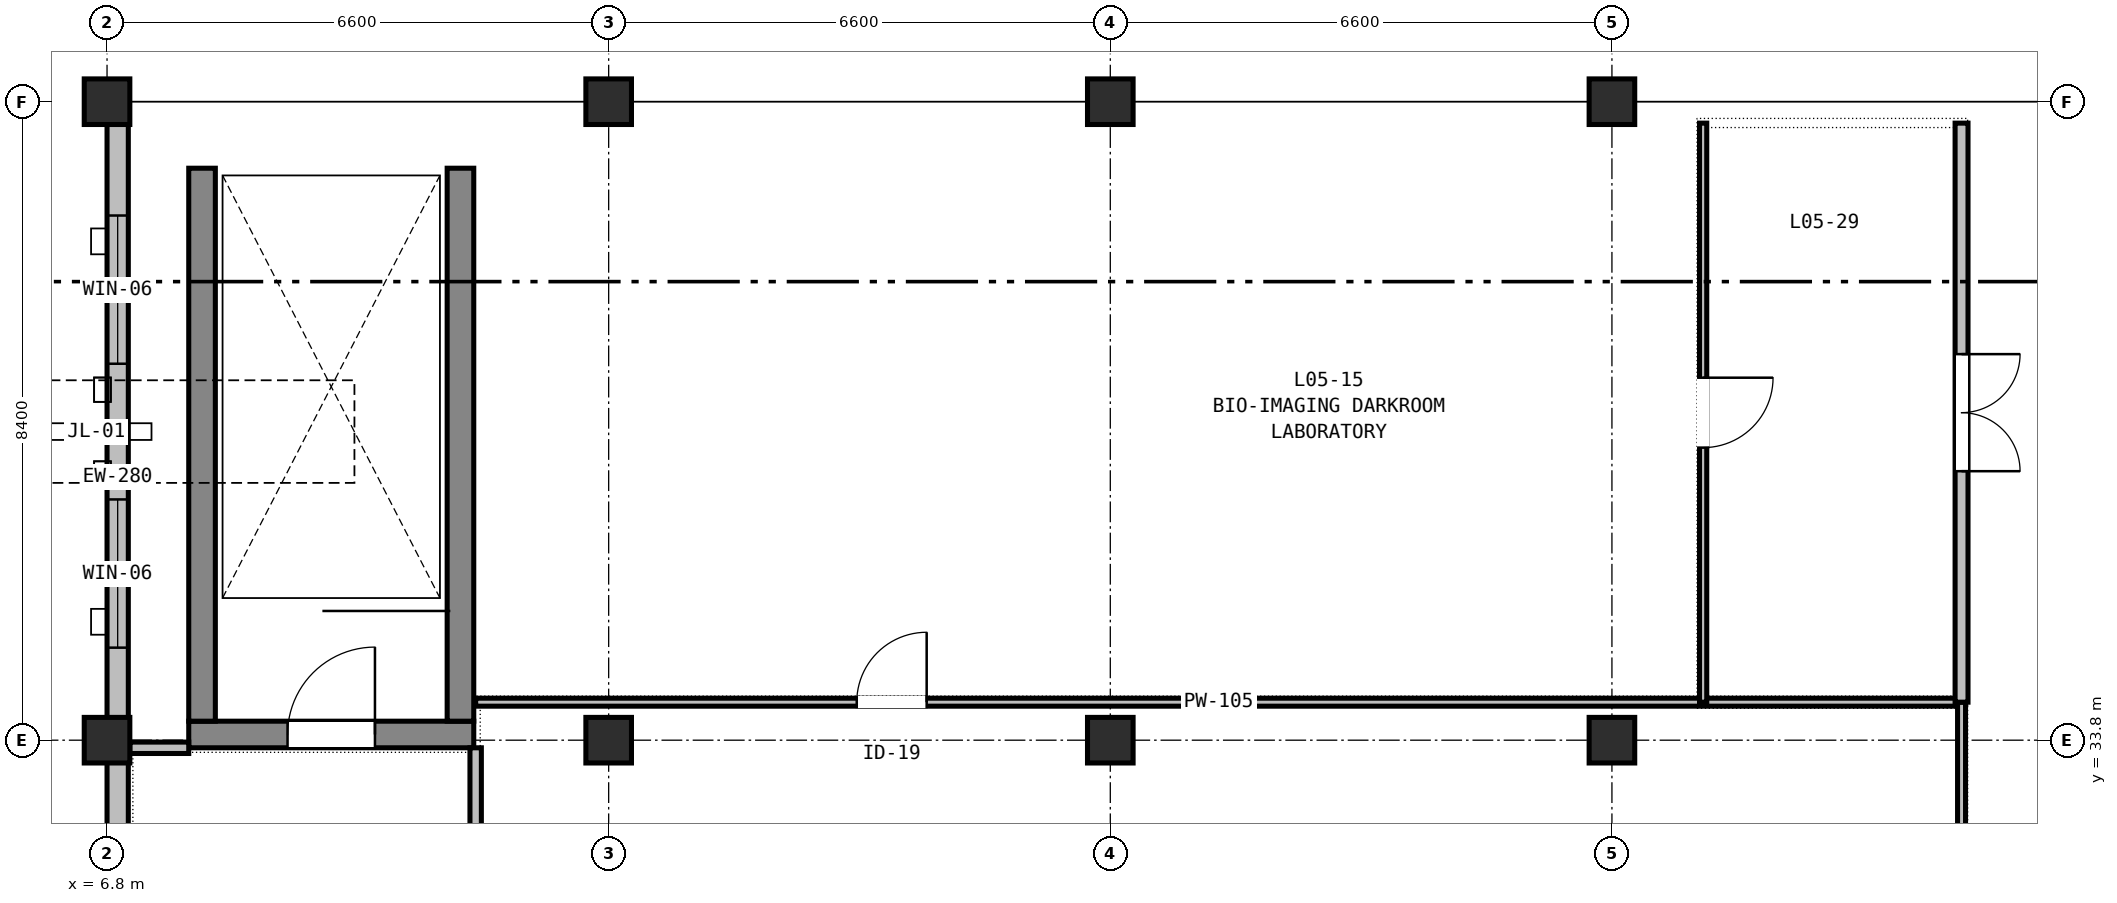
"""IFC4 building model, lengths in metres.
Left out: names, types, materials, properties, quantities, classifications, styles, units other than length and angle.
Written with IfcOpenShell. Run it as: python <this file> out.ifc"""

import sys

from ifc_helpers import new_model, si_unit, direction, frame, frame_2d, origin, origin_2d, place, context, subcontext, project, spatial, rectangle, extrude, element, fill, save


model = new_model("IFC4")
c1 = context("Model", 3, precision=1e-05, world=origin(), true_north=direction((0.0, 1.0)))
c2 = subcontext(c1, "Body", "Model", "MODEL_VIEW")
j1 = project(units=[si_unit("LENGTHUNIT", "METRE"), si_unit("PLANEANGLEUNIT", "RADIAN")], contexts=[c1])
p1 = place(None, origin())
s1 = spatial("IfcSite", under=j1, at=p1, CompositionType="ELEMENT")
p2 = place(p1, origin())
s2 = spatial("IfcBuilding", under=s1, at=p2, CompositionType="ELEMENT")
p3 = place(p2, frame((0.0, 0.0, 24.0)))
s3 = spatial("IfcBuildingStorey", under=s2, at=p3, CompositionType="ELEMENT", Elevation=24.0)
for number, where, z_axis, x_axis in (
    (1, (6.8, 33.8, 0.0), (0.0, 0.0, 1.0), (1.0, 0.0, 0.0)),
    (2, (6.8, 42.2, 0.0), (0.0, 0.0, 1.0), (1.0, 0.0, 0.0)),
    (3, (13.4, 33.8, 0.0), (0.0, 0.0, 1.0), (1.0, 0.0, 0.0)),
    (4, (13.4, 42.2, 0.0), (0.0, 0.0, 1.0), (1.0, 0.0, 0.0)),
    (5, (20.0, 33.8, 0.0), (0.0, 0.0, 1.0), (1.0, 0.0, 0.0)),
    (6, (20.0, 42.2, 0.0), (0.0, 0.0, 1.0), (1.0, 0.0, 0.0)),
    (7, (26.6, 33.8, 0.0), (0.0, 0.0, 1.0), (1.0, 0.0, 0.0)),
    (8, (26.6, 42.2, 0.0), (0.0, 0.0, 1.0), (1.0, 0.0, 0.0)),
):
    element("IfcColumn", number, at=place(p3, frame(where, z_axis=z_axis, x_axis=x_axis)), inside=s3, PredefinedType="COLUMN", context=c2, shape_type="SweptSolid", body=[
        extrude(rectangle(XDim=0.6, YDim=0.6, at=origin_2d()), origin(), (0.0, 0.0, 1.0), 4.44),
    ])
p4 = place(p3, frame((7.875, 33.875, 0.0), z_axis=(0.0, 0.0, 1.0), x_axis=(1.0, 0.0, 0.0)))
e9 = element("IfcWall", 9, at=p4, inside=s3, PredefinedType="SHEAR", context=c2, shape_type="SweptSolid", body=[
    extrude(rectangle(XDim=3.75, YDim=0.35, at=frame_2d((1.875, 0.0))), origin(), (0.0, 0.0, 1.0), 4.44),
])
p5 = place(p4, frame((1.3, 0.0, 0.0)))
e10 = element("IfcOpeningElement", 10, at=p5, cuts=e9, PredefinedType="OPENING", context=c2, shape_type="SweptSolid", body=[
    extrude(rectangle(XDim=1.15, YDim=2.15, at=frame_2d((0.575, 1.075))), frame((0.0, 0.185, 0.0), z_axis=(0.0, -1.0, 0.0), x_axis=(1.0, 0.0, 0.0)), (0.0, 0.0, 1.0), 0.37),
])
p6 = place(p3, frame((7.875, 41.5, 0.0), z_axis=(0.0, 0.0, 1.0), x_axis=(1.0, 0.0, 0.0)))
e11 = element("IfcWall", 11, at=p6, inside=s3, PredefinedType="SHEAR", context=c2, shape_type="SweptSolid", body=[
    extrude(rectangle(XDim=3.75, YDim=0.35, at=frame_2d((1.875, 0.0))), origin(), (0.0, 0.0, 1.0), 4.44),
])
for number, where, z_axis, x_axis in (
    (12, (8.05, 34.05, 0.0), (0.0, 0.0, 1.0), (0.0, 1.0, 0.0)),
    (13, (11.45, 34.05, 0.0), (0.0, 0.0, 1.0), (0.0, 1.0, 0.0)),
):
    element("IfcWall", number, at=place(p3, frame(where, z_axis=z_axis, x_axis=x_axis)), inside=s3, PredefinedType="SHEAR", context=c2, shape_type="SweptSolid", body=[
        extrude(rectangle(XDim=7.275, YDim=0.35, at=frame_2d((3.637, 0.0))), origin(), (0.0, 0.0, 1.0), 4.44),
    ])
p7 = place(p3, frame((6.8, 42.06, 0.0), z_axis=(0.0, 0.0, 1.0), x_axis=(1.0, 0.0, 0.0)))
e14 = element("IfcWall", 14, at=p7, inside=s3, PredefinedType="STANDARD", context=c2, shape_type="SweptSolid", body=[
    extrude(rectangle(XDim=6.6, YDim=0.28, at=frame_2d((3.3, 0.0))), origin(), (0.0, 0.0, 1.0), 3.735),
])
p8 = place(p7, frame((0.982, 0.0, 0.9)))
e15 = element("IfcOpeningElement", 15, at=p8, cuts=e14, PredefinedType="OPENING", context=c2, shape_type="SweptSolid", body=[
    extrude(rectangle(XDim=1.6, YDim=1.6, at=frame_2d((0.8, 0.8))), frame((0.0, 0.15, 0.0), z_axis=(0.0, -1.0, 0.0), x_axis=(1.0, 0.0, 0.0)), (0.0, 0.0, 1.0), 0.3),
])
p9 = place(p7, frame((4.018, 0.0, 0.9)))
e16 = element("IfcOpeningElement", 16, at=p9, cuts=e14, PredefinedType="OPENING", context=c2, shape_type="SweptSolid", body=[
    extrude(rectangle(XDim=1.6, YDim=1.6, at=frame_2d((0.8, 0.8))), frame((0.0, 0.15, 0.0), z_axis=(0.0, -1.0, 0.0), x_axis=(1.0, 0.0, 0.0)), (0.0, 0.0, 1.0), 0.3),
])
p10 = place(p3, frame((13.4, 42.06, 0.0), z_axis=(0.0, 0.0, 1.0), x_axis=(1.0, 0.0, 0.0)))
e17 = element("IfcWall", 17, at=p10, inside=s3, PredefinedType="STANDARD", context=c2, shape_type="SweptSolid", body=[
    extrude(rectangle(XDim=6.6, YDim=0.28, at=frame_2d((3.3, 0.0))), origin(), (0.0, 0.0, 1.0), 3.735),
])
p11 = place(p10, frame((0.857, 0.0, 0.9)))
e18 = element("IfcOpeningElement", 18, at=p11, cuts=e17, PredefinedType="OPENING", context=c2, shape_type="SweptSolid", body=[
    extrude(rectangle(XDim=1.85, YDim=1.6, at=frame_2d((0.925, 0.8))), frame((0.0, 0.15, 0.0), z_axis=(0.0, -1.0, 0.0), x_axis=(1.0, 0.0, 0.0)), (0.0, 0.0, 1.0), 0.3),
])
p12 = place(p10, frame((3.893, 0.0, 0.9)))
e19 = element("IfcOpeningElement", 19, at=p12, cuts=e17, PredefinedType="OPENING", context=c2, shape_type="SweptSolid", body=[
    extrude(rectangle(XDim=1.85, YDim=1.6, at=frame_2d((0.925, 0.8))), frame((0.0, 0.15, 0.0), z_axis=(0.0, -1.0, 0.0), x_axis=(1.0, 0.0, 0.0)), (0.0, 0.0, 1.0), 0.3),
])
p13 = place(p3, frame((20.0, 42.06, 0.0), z_axis=(0.0, 0.0, 1.0), x_axis=(1.0, 0.0, 0.0)))
e20 = element("IfcWall", 20, at=p13, inside=s3, PredefinedType="STANDARD", context=c2, shape_type="SweptSolid", body=[
    extrude(rectangle(XDim=6.6, YDim=0.28, at=frame_2d((3.3, 0.0))), origin(), (0.0, 0.0, 1.0), 3.735),
])
p14 = place(p13, frame((0.757, 0.0, 0.9)))
e21 = element("IfcOpeningElement", 21, at=p14, cuts=e20, PredefinedType="OPENING", context=c2, shape_type="SweptSolid", body=[
    extrude(rectangle(XDim=2.05, YDim=1.65, at=frame_2d((1.025, 0.825))), frame((0.0, 0.15, 0.0), z_axis=(0.0, -1.0, 0.0), x_axis=(1.0, 0.0, 0.0)), (0.0, 0.0, 1.0), 0.3),
])
p15 = place(p13, frame((3.793, 0.0, 0.9)))
e22 = element("IfcOpeningElement", 22, at=p15, cuts=e20, PredefinedType="OPENING", context=c2, shape_type="SweptSolid", body=[
    extrude(rectangle(XDim=2.05, YDim=1.65, at=frame_2d((1.025, 0.825))), frame((0.0, 0.15, 0.0), z_axis=(0.0, -1.0, 0.0), x_axis=(1.0, 0.0, 0.0)), (0.0, 0.0, 1.0), 0.3),
])
p16 = place(p3, frame((26.6, 42.06, 0.0), z_axis=(0.0, 0.0, 1.0), x_axis=(1.0, 0.0, 0.0)))
e23 = element("IfcWall", 23, at=p16, inside=s3, PredefinedType="STANDARD", context=c2, shape_type="SweptSolid", body=[
    extrude(rectangle(XDim=6.6, YDim=0.28, at=frame_2d((3.3, 0.0))), origin(), (0.0, 0.0, 1.0), 3.735),
])
p17 = place(p16, frame((1.44, 0.0, 0.9)))
e24 = element("IfcOpeningElement", 24, at=p17, cuts=e23, PredefinedType="OPENING", context=c2, shape_type="SweptSolid", body=[
    extrude(rectangle(XDim=2.35, YDim=1.5, at=frame_2d((1.175, 0.75))), frame((0.0, 0.15, 0.0), z_axis=(0.0, -1.0, 0.0), x_axis=(1.0, 0.0, 0.0)), (0.0, 0.0, 1.0), 0.3),
])
p18 = place(p3, frame((6.94, 25.4, 0.0), z_axis=(0.0, 0.0, 1.0), x_axis=(0.0, 1.0, 0.0)))
e25 = element("IfcWall", 25, at=p18, inside=s3, PredefinedType="STANDARD", context=c2, shape_type="SweptSolid", body=[
    extrude(rectangle(XDim=8.4, YDim=0.28, at=frame_2d((4.2, 0.0))), origin(), (0.0, 0.0, 1.0), 3.885),
])
p19 = place(p18, frame((1.368, 0.0, 0.9)))
e26 = element("IfcOpeningElement", 26, at=p19, cuts=e25, PredefinedType="OPENING", context=c2, shape_type="SweptSolid", body=[
    extrude(rectangle(XDim=1.8, YDim=2.1, at=frame_2d((0.9, 1.05))), frame((0.0, 0.15, 0.0), z_axis=(0.0, -1.0, 0.0), x_axis=(1.0, 0.0, 0.0)), (0.0, 0.0, 1.0), 0.3),
])
p20 = place(p18, frame((5.232, 0.0, 0.9)))
e27 = element("IfcOpeningElement", 27, at=p20, cuts=e25, PredefinedType="OPENING", context=c2, shape_type="SweptSolid", body=[
    extrude(rectangle(XDim=1.8, YDim=2.1, at=frame_2d((0.9, 1.05))), frame((0.0, 0.15, 0.0), z_axis=(0.0, -1.0, 0.0), x_axis=(1.0, 0.0, 0.0)), (0.0, 0.0, 1.0), 0.3),
])
p21 = place(p3, frame((6.94, 33.8, 0.0), z_axis=(0.0, 0.0, 1.0), x_axis=(0.0, 1.0, 0.0)))
e28 = element("IfcWall", 28, at=p21, inside=s3, PredefinedType="STANDARD", context=c2, shape_type="SweptSolid", body=[
    extrude(rectangle(XDim=8.12, YDim=0.28, at=frame_2d((4.06, 0.0))), origin(), (0.0, 0.0, 1.0), 3.885),
])
p22 = place(p21, frame((1.217, 0.0, 0.9)))
e29 = element("IfcOpeningElement", 29, at=p22, cuts=e28, PredefinedType="OPENING", context=c2, shape_type="SweptSolid", body=[
    extrude(rectangle(XDim=1.95, YDim=2.1, at=frame_2d((0.975, 1.05))), frame((0.0, 0.15, 0.0), z_axis=(0.0, -1.0, 0.0), x_axis=(1.0, 0.0, 0.0)), (0.0, 0.0, 1.0), 0.3),
])
p23 = place(p21, frame((4.953, 0.0, 0.9)))
e30 = element("IfcOpeningElement", 30, at=p23, cuts=e28, PredefinedType="OPENING", context=c2, shape_type="SweptSolid", body=[
    extrude(rectangle(XDim=1.95, YDim=2.1, at=frame_2d((0.975, 1.05))), frame((0.0, 0.15, 0.0), z_axis=(0.0, -1.0, 0.0), x_axis=(1.0, 0.0, 0.0)), (0.0, 0.0, 1.0), 0.3),
])
p24 = place(p3, frame((7.1, 33.7, 0.0), z_axis=(0.0, 0.0, 1.0), x_axis=(1.0, 0.0, 0.0)))
e31 = element("IfcWall", 31, at=p24, inside=s3, PredefinedType="PARTITIONING", context=c2, shape_type="SweptSolid", body=[
    extrude(rectangle(XDim=0.775, YDim=0.15, at=frame_2d((0.387, 0.0))), origin(), (0.0, 0.0, 1.0), 3.885),
])
p25 = place(p3, frame((11.65, 33.7, 0.0), z_axis=(0.0, 0.0, 1.0), x_axis=(0.0, -1.0, 0.0)))
e32 = element("IfcWall", 32, at=p25, inside=s3, PredefinedType="PARTITIONING", context=c2, shape_type="SweptSolid", body=[
    extrude(rectangle(XDim=3.6, YDim=0.15, at=frame_2d((1.8, 0.0))), origin(), (0.0, 0.0, 1.0), 3.885),
])
p26 = place(p3, frame((11.65, 34.3, 0.0), z_axis=(0.0, 0.0, 1.0), x_axis=(1.0, 0.0, 0.0)))
e33 = element("IfcWall", 33, at=p26, inside=s3, PredefinedType="PARTITIONING", context=c2, shape_type="SweptSolid", body=[
    extrude(rectangle(XDim=19.55, YDim=0.105, at=frame_2d((9.775, 0.0))), origin(), (0.0, 0.0, 1.0), 3.735),
])
p27 = place(p26, frame((5.014, 0.0, 0.0)))
e34 = element("IfcOpeningElement", 34, at=p27, cuts=e33, PredefinedType="OPENING", context=c2, shape_type="SweptSolid", body=[
    extrude(rectangle(XDim=0.92, YDim=2.14, at=frame_2d((0.46, 1.07))), frame((0.0, 0.062, 0.0), z_axis=(0.0, -1.0, 0.0), x_axis=(1.0, 0.0, 0.0)), (0.0, 0.0, 1.0), 0.125),
])
p28 = place(p3, frame((31.2, 34.3, 0.0), z_axis=(0.0, 0.0, 1.0), x_axis=(0.0, -1.0, 0.0)))
e35 = element("IfcWall", 35, at=p28, inside=s3, PredefinedType="PARTITIONING", context=c2, shape_type="SweptSolid", body=[
    extrude(rectangle(XDim=8.9, YDim=0.105, at=frame_2d((4.45, 0.0))), origin(), (0.0, 0.0, 1.0), 3.885),
])
p29 = place(p28, frame((3.86, 0.0, 0.0)))
e36 = element("IfcOpeningElement", 36, at=p29, cuts=e35, PredefinedType="OPENING", context=c2, shape_type="SweptSolid", body=[
    extrude(rectangle(XDim=1.18, YDim=2.1, at=frame_2d((0.59, 1.05))), frame((0.0, 0.062, 0.0), z_axis=(0.0, -1.0, 0.0), x_axis=(1.0, 0.0, 0.0)), (0.0, 0.0, 1.0), 0.125),
])
p30 = place(p3, frame((27.8, 41.918, 0.0), z_axis=(0.0, 0.0, 1.0), x_axis=(0.0, -1.0, 0.0)))
e37 = element("IfcWall", 37, at=p30, inside=s3, PredefinedType="PARTITIONING", context=c2, shape_type="SweptSolid", body=[
    extrude(rectangle(XDim=7.618, YDim=0.095, at=frame_2d((3.809, 0.0))), origin(), (0.0, 0.0, 1.0), 4.215),
])
p31 = place(p30, frame((3.349, 0.0, 0.0)))
e38 = element("IfcOpeningElement", 38, at=p31, cuts=e37, PredefinedType="OPENING", context=c2, shape_type="SweptSolid", body=[
    extrude(rectangle(XDim=0.92, YDim=2.14, at=frame_2d((0.46, 1.07))), frame((0.0, 0.057, 0.0), z_axis=(0.0, -1.0, 0.0), x_axis=(1.0, 0.0, 0.0)), (0.0, 0.0, 1.0), 0.115),
])
p32 = place(p3, frame((31.2, 41.918, 0.0), z_axis=(0.0, 0.0, 1.0), x_axis=(0.0, -1.0, 0.0)))
e39 = element("IfcWall", 39, at=p32, inside=s3, PredefinedType="PARTITIONING", context=c2, shape_type="SweptSolid", body=[
    extrude(rectangle(XDim=7.618, YDim=0.17, at=frame_2d((3.809, 0.0))), origin(), (0.0, 0.0, 1.0), 4.215),
])
p33 = place(p32, frame((3.039, 0.0, 0.0)))
e40 = element("IfcOpeningElement", 40, at=p33, cuts=e39, PredefinedType="OPENING", context=c2, shape_type="SweptSolid", body=[
    extrude(rectangle(XDim=1.54, YDim=2.2, at=frame_2d((0.77, 1.1))), frame((0.0, 0.095, 0.0), z_axis=(0.0, -1.0, 0.0), x_axis=(1.0, 0.0, 0.0)), (0.0, 0.0, 1.0), 0.19),
])
p34 = place(p8, origin())
e41 = element("IfcWindow", 41, at=p34, inside=s3, PartitioningType="SINGLE_PANEL", PredefinedType="WINDOW", context=c2, shape_type="SweptSolid", body=[
    extrude(rectangle(XDim=1.6, YDim=1.6, at=frame_2d((0.8, 0.8))), frame((0.0, 0.03, 0.0), z_axis=(0.0, -1.0, 0.0), x_axis=(1.0, 0.0, 0.0)), (0.0, 0.0, 1.0), 0.06),
])
fill(e15, e41)
p35 = place(p9, origin())
e42 = element("IfcWindow", 42, at=p35, inside=s3, PartitioningType="SINGLE_PANEL", PredefinedType="WINDOW", context=c2, shape_type="SweptSolid", body=[
    extrude(rectangle(XDim=1.6, YDim=1.6, at=frame_2d((0.8, 0.8))), frame((0.0, 0.03, 0.0), z_axis=(0.0, -1.0, 0.0), x_axis=(1.0, 0.0, 0.0)), (0.0, 0.0, 1.0), 0.06),
])
fill(e16, e42)
p36 = place(p11, origin())
e43 = element("IfcWindow", 43, at=p36, inside=s3, PartitioningType="SINGLE_PANEL", PredefinedType="WINDOW", context=c2, shape_type="SweptSolid", body=[
    extrude(rectangle(XDim=1.85, YDim=1.6, at=frame_2d((0.925, 0.8))), frame((0.0, 0.03, 0.0), z_axis=(0.0, -1.0, 0.0), x_axis=(1.0, 0.0, 0.0)), (0.0, 0.0, 1.0), 0.06),
])
fill(e18, e43)
p37 = place(p12, origin())
e44 = element("IfcWindow", 44, at=p37, inside=s3, PartitioningType="SINGLE_PANEL", PredefinedType="WINDOW", context=c2, shape_type="SweptSolid", body=[
    extrude(rectangle(XDim=1.85, YDim=1.6, at=frame_2d((0.925, 0.8))), frame((0.0, 0.03, 0.0), z_axis=(0.0, -1.0, 0.0), x_axis=(1.0, 0.0, 0.0)), (0.0, 0.0, 1.0), 0.06),
])
fill(e19, e44)
p38 = place(p14, origin())
e45 = element("IfcWindow", 45, at=p38, inside=s3, PartitioningType="SINGLE_PANEL", PredefinedType="WINDOW", context=c2, shape_type="SweptSolid", body=[
    extrude(rectangle(XDim=2.05, YDim=1.65, at=frame_2d((1.025, 0.825))), frame((0.0, 0.03, 0.0), z_axis=(0.0, -1.0, 0.0), x_axis=(1.0, 0.0, 0.0)), (0.0, 0.0, 1.0), 0.06),
])
fill(e21, e45)
p39 = place(p15, origin())
e46 = element("IfcWindow", 46, at=p39, inside=s3, PartitioningType="SINGLE_PANEL", PredefinedType="WINDOW", context=c2, shape_type="SweptSolid", body=[
    extrude(rectangle(XDim=2.05, YDim=1.65, at=frame_2d((1.025, 0.825))), frame((0.0, 0.03, 0.0), z_axis=(0.0, -1.0, 0.0), x_axis=(1.0, 0.0, 0.0)), (0.0, 0.0, 1.0), 0.06),
])
fill(e22, e46)
p40 = place(p17, origin())
e47 = element("IfcWindow", 47, at=p40, inside=s3, PartitioningType="SINGLE_PANEL", PredefinedType="WINDOW", context=c2, shape_type="SweptSolid", body=[
    extrude(rectangle(XDim=2.35, YDim=1.5, at=frame_2d((1.175, 0.75))), frame((0.0, 0.03, 0.0), z_axis=(0.0, -1.0, 0.0), x_axis=(1.0, 0.0, 0.0)), (0.0, 0.0, 1.0), 0.06),
])
fill(e24, e47)
p41 = place(p22, origin())
e48 = element("IfcWindow", 48, at=p41, inside=s3, PartitioningType="SINGLE_PANEL", PredefinedType="WINDOW", context=c2, shape_type="SweptSolid", body=[
    extrude(rectangle(XDim=1.95, YDim=2.1, at=frame_2d((0.975, 1.05))), frame((0.0, 0.03, 0.0), z_axis=(0.0, -1.0, 0.0), x_axis=(1.0, 0.0, 0.0)), (0.0, 0.0, 1.0), 0.06),
])
fill(e29, e48)
p42 = place(p23, origin())
e49 = element("IfcWindow", 49, at=p42, inside=s3, PartitioningType="SINGLE_PANEL", PredefinedType="WINDOW", context=c2, shape_type="SweptSolid", body=[
    extrude(rectangle(XDim=1.95, YDim=2.1, at=frame_2d((0.975, 1.05))), frame((0.0, 0.03, 0.0), z_axis=(0.0, -1.0, 0.0), x_axis=(1.0, 0.0, 0.0)), (0.0, 0.0, 1.0), 0.06),
])
fill(e30, e49)
p43 = place(p5, origin())
e50 = element("IfcDoor", 50, at=p43, inside=s3, OperationType="SINGLE_SWING_RIGHT", PredefinedType="DOOR", context=c2, shape_type="SweptSolid", body=[
    extrude(rectangle(XDim=1.15, YDim=2.15, at=frame_2d((0.575, 1.075))), frame((0.0, 0.025, 0.0), z_axis=(0.0, -1.0, 0.0), x_axis=(1.0, 0.0, 0.0)), (0.0, 0.0, 1.0), 0.05),
])
fill(e10, e50)
p44 = place(p31, origin())
e51 = element("IfcDoor", 51, at=p44, inside=s3, OperationType="SINGLE_SWING_LEFT", PredefinedType="DOOR", context=c2, shape_type="SweptSolid", body=[
    extrude(rectangle(XDim=0.92, YDim=2.14, at=frame_2d((0.46, 1.07))), frame((0.0, 0.025, 0.0), z_axis=(0.0, -1.0, 0.0), x_axis=(1.0, 0.0, 0.0)), (0.0, 0.0, 1.0), 0.05),
])
fill(e38, e51)
p45 = place(p27, origin())
e52 = element("IfcDoor", 52, at=p45, inside=s3, OperationType="SINGLE_SWING_RIGHT", PredefinedType="DOOR", context=c2, shape_type="SweptSolid", body=[
    extrude(rectangle(XDim=0.92, YDim=2.14, at=frame_2d((0.46, 1.07))), frame((0.0, 0.025, 0.0), z_axis=(0.0, -1.0, 0.0), x_axis=(1.0, 0.0, 0.0)), (0.0, 0.0, 1.0), 0.05),
])
fill(e34, e52)
p46 = place(p33, origin())
e53 = element("IfcDoor", 53, at=p46, inside=s3, OperationType="DOUBLE_DOOR_SINGLE_SWING", PredefinedType="DOOR", context=c2, shape_type="SweptSolid", body=[
    extrude(rectangle(XDim=1.54, YDim=2.2, at=frame_2d((0.77, 1.1))), frame((0.0, 0.025, 0.0), z_axis=(0.0, -1.0, 0.0), x_axis=(1.0, 0.0, 0.0)), (0.0, 0.0, 1.0), 0.05),
])
fill(e40, e53)
save(model, sys.argv[1])
